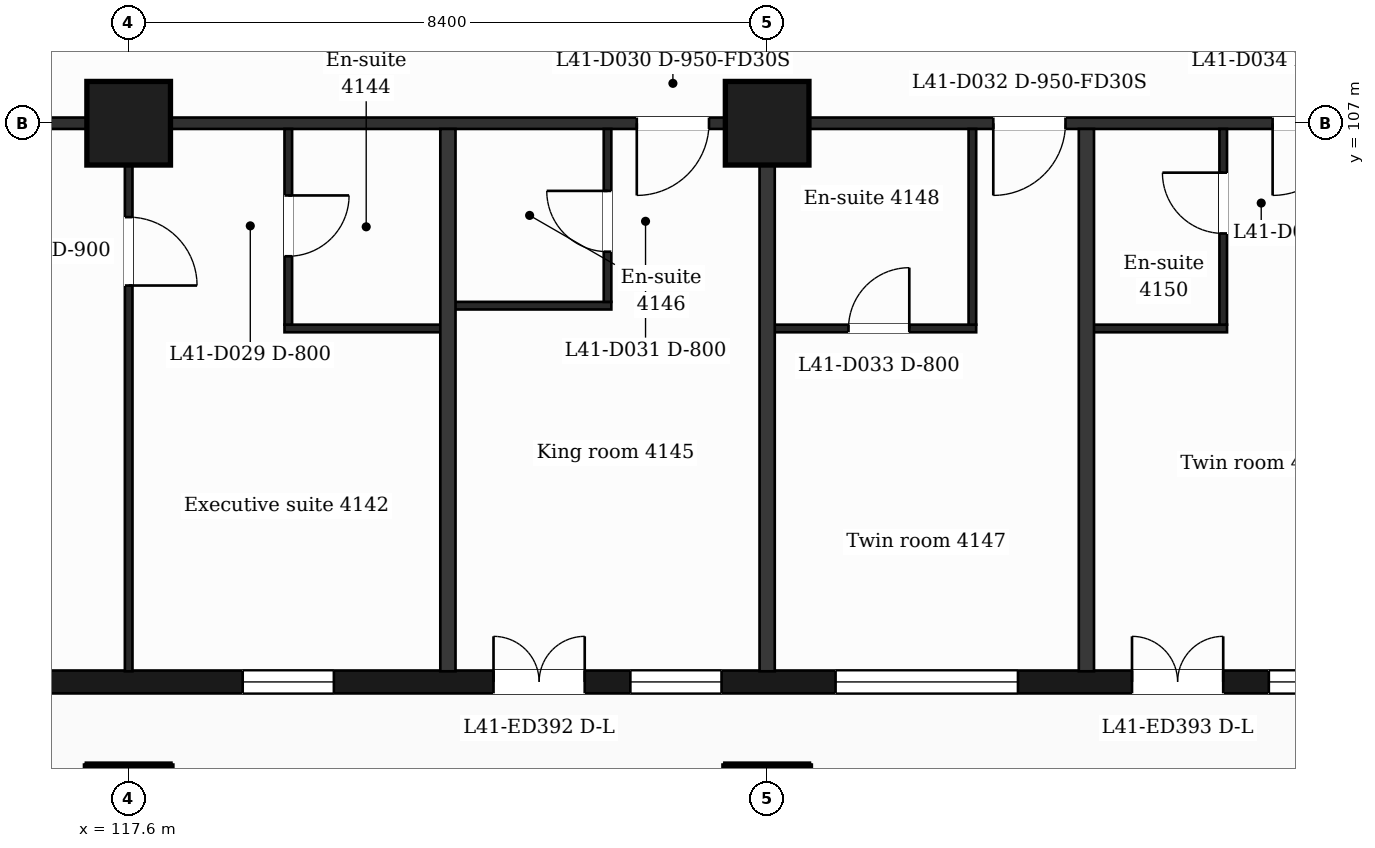
"""IFC4 building model, lengths in metres.
Left out: names, types, materials, properties, quantities, classifications, styles, units other than length and angle.
Written with IfcOpenShell. Run it as: python <this file> out.ifc"""

import sys

from ifc_helpers import new_model, si_unit, direction, frame, frame_2d, origin, origin_2d, place, context, subcontext, project, spatial, rectangle, extrude, element, fill, save


model = new_model("IFC4")
c1 = context("Model", 3, precision=1e-05, world=origin(), true_north=direction((0.0, 1.0)))
c2 = subcontext(c1, "Body", "Model", "MODEL_VIEW")
j1 = project(units=[si_unit("LENGTHUNIT", "METRE"), si_unit("PLANEANGLEUNIT", "RADIAN")], contexts=[c1])
p1 = place(None, origin())
s1 = spatial("IfcSite", under=j1, at=p1, CompositionType="ELEMENT")
p2 = place(p1, origin())
s2 = spatial("IfcBuilding", under=s1, at=p2, CompositionType="ELEMENT")
p3 = place(p2, frame((0.0, 0.0, 173.7)))
s3 = spatial("IfcBuildingStorey", under=s2, at=p3, CompositionType="ELEMENT", Elevation=173.7)
for number, where, z_axis, x_axis in (
    (1, (117.6, 98.0, 0.0), (0.0, 0.0, 1.0), (1.0, 0.0, 0.0)),
    (2, (126.0, 98.0, 0.0), (0.0, 0.0, 1.0), (1.0, 0.0, 0.0)),
    (3, (117.6, 107.0, 0.0), (0.0, 0.0, 1.0), (1.0, 0.0, 0.0)),
    (4, (126.0, 107.0, 0.0), (0.0, 0.0, 1.0), (1.0, 0.0, 0.0)),
):
    element("IfcColumn", number, at=place(p3, frame(where, z_axis=z_axis, x_axis=x_axis)), inside=s3, PredefinedType="COLUMN", context=c2, shape_type="SweptSolid", body=[
        extrude(rectangle(XDim=1.1, YDim=1.1, at=origin_2d()), origin(), (0.0, 0.0, 1.0), 3.7),
    ])
p4 = place(p3, frame((89.85, 99.65, 0.0), z_axis=(0.0, 0.0, 1.0), x_axis=(1.0, 0.0, 0.0)))
e5 = element("IfcWall", 5, at=p4, inside=s3, PredefinedType="SOLIDWALL", context=c2, shape_type="SweptSolid", body=[
    extrude(rectangle(XDim=47.25, YDim=0.3, at=frame_2d((23.625, 0.0))), origin(), (0.0, 0.0, 1.0), 3.38),
])
p5 = place(p4, frame((0.725, 0.0, 0.9)))
e6 = element("IfcOpeningElement", 6, at=p5, cuts=e5, PredefinedType="OPENING", context=c2, shape_type="SweptSolid", body=[
    extrude(rectangle(XDim=1.2, YDim=2.1, at=frame_2d((0.6, 1.05))), frame((0.0, 0.16, 0.0), z_axis=(0.0, -1.0, 0.0), x_axis=(1.0, 0.0, 0.0)), (0.0, 0.0, 1.0), 0.32),
])
p6 = place(p4, frame((3.45, 0.0, 0.9)))
e7 = element("IfcOpeningElement", 7, at=p6, cuts=e5, PredefinedType="OPENING", context=c2, shape_type="SweptSolid", body=[
    extrude(rectangle(XDim=2.4, YDim=2.1, at=frame_2d((1.2, 1.05))), frame((0.0, 0.16, 0.0), z_axis=(0.0, -1.0, 0.0), x_axis=(1.0, 0.0, 0.0)), (0.0, 0.0, 1.0), 0.32),
])
p7 = place(p4, frame((7.65, 0.0, 0.9)))
e8 = element("IfcOpeningElement", 8, at=p7, cuts=e5, PredefinedType="OPENING", context=c2, shape_type="SweptSolid", body=[
    extrude(rectangle(XDim=2.4, YDim=2.1, at=frame_2d((1.2, 1.05))), frame((0.0, 0.16, 0.0), z_axis=(0.0, -1.0, 0.0), x_axis=(1.0, 0.0, 0.0)), (0.0, 0.0, 1.0), 0.32),
])
p8 = place(p4, frame((11.85, 0.0, 0.9)))
e9 = element("IfcOpeningElement", 9, at=p8, cuts=e5, PredefinedType="OPENING", context=c2, shape_type="SweptSolid", body=[
    extrude(rectangle(XDim=2.4, YDim=2.1, at=frame_2d((1.2, 1.05))), frame((0.0, 0.16, 0.0), z_axis=(0.0, -1.0, 0.0), x_axis=(1.0, 0.0, 0.0)), (0.0, 0.0, 1.0), 0.32),
])
p9 = place(p4, frame((16.05, 0.0, 0.9)))
e10 = element("IfcOpeningElement", 10, at=p9, cuts=e5, PredefinedType="OPENING", context=c2, shape_type="SweptSolid", body=[
    extrude(rectangle(XDim=2.4, YDim=2.1, at=frame_2d((1.2, 1.05))), frame((0.0, 0.16, 0.0), z_axis=(0.0, -1.0, 0.0), x_axis=(1.0, 0.0, 0.0)), (0.0, 0.0, 1.0), 0.32),
])
p10 = place(p4, frame((20.25, 0.0, 0.9)))
e11 = element("IfcOpeningElement", 11, at=p10, cuts=e5, PredefinedType="OPENING", context=c2, shape_type="SweptSolid", body=[
    extrude(rectangle(XDim=2.4, YDim=2.1, at=frame_2d((1.2, 1.05))), frame((0.0, 0.16, 0.0), z_axis=(0.0, -1.0, 0.0), x_axis=(1.0, 0.0, 0.0)), (0.0, 0.0, 1.0), 0.32),
])
p11 = place(p4, frame((25.05, 0.0, 0.9)))
e12 = element("IfcOpeningElement", 12, at=p11, cuts=e5, PredefinedType="OPENING", context=c2, shape_type="SweptSolid", body=[
    extrude(rectangle(XDim=1.2, YDim=2.1, at=frame_2d((0.6, 1.05))), frame((0.0, 0.16, 0.0), z_axis=(0.0, -1.0, 0.0), x_axis=(1.0, 0.0, 0.0)), (0.0, 0.0, 1.0), 0.32),
])
p12 = place(p4, frame((29.25, 0.0, 0.9)))
e13 = element("IfcOpeningElement", 13, at=p12, cuts=e5, PredefinedType="OPENING", context=c2, shape_type="SweptSolid", body=[
    extrude(rectangle(XDim=1.2, YDim=2.1, at=frame_2d((0.6, 1.05))), frame((0.0, 0.16, 0.0), z_axis=(0.0, -1.0, 0.0), x_axis=(1.0, 0.0, 0.0)), (0.0, 0.0, 1.0), 0.32),
])
p13 = place(p4, frame((32.55, 0.0, 0.0)))
e14 = element("IfcOpeningElement", 14, at=p13, cuts=e5, PredefinedType="OPENING", context=c2, shape_type="SweptSolid", body=[
    extrude(rectangle(XDim=1.2, YDim=2.4, at=frame_2d((0.6, 1.2))), frame((0.0, 0.16, 0.0), z_axis=(0.0, -1.0, 0.0), x_axis=(1.0, 0.0, 0.0)), (0.0, 0.0, 1.0), 0.32),
])
p14 = place(p4, frame((34.35, 0.0, 0.9)))
e15 = element("IfcOpeningElement", 15, at=p14, cuts=e5, PredefinedType="OPENING", context=c2, shape_type="SweptSolid", body=[
    extrude(rectangle(XDim=1.2, YDim=2.1, at=frame_2d((0.6, 1.05))), frame((0.0, 0.16, 0.0), z_axis=(0.0, -1.0, 0.0), x_axis=(1.0, 0.0, 0.0)), (0.0, 0.0, 1.0), 0.32),
])
p15 = place(p4, frame((37.05, 0.0, 0.9)))
e16 = element("IfcOpeningElement", 16, at=p15, cuts=e5, PredefinedType="OPENING", context=c2, shape_type="SweptSolid", body=[
    extrude(rectangle(XDim=2.4, YDim=2.1, at=frame_2d((1.2, 1.05))), frame((0.0, 0.16, 0.0), z_axis=(0.0, -1.0, 0.0), x_axis=(1.0, 0.0, 0.0)), (0.0, 0.0, 1.0), 0.32),
])
p16 = place(p4, frame((40.95, 0.0, 0.0)))
e17 = element("IfcOpeningElement", 17, at=p16, cuts=e5, PredefinedType="OPENING", context=c2, shape_type="SweptSolid", body=[
    extrude(rectangle(XDim=1.2, YDim=2.4, at=frame_2d((0.6, 1.2))), frame((0.0, 0.16, 0.0), z_axis=(0.0, -1.0, 0.0), x_axis=(1.0, 0.0, 0.0)), (0.0, 0.0, 1.0), 0.32),
])
p17 = place(p4, frame((42.75, 0.0, 0.9)))
e18 = element("IfcOpeningElement", 18, at=p17, cuts=e5, PredefinedType="OPENING", context=c2, shape_type="SweptSolid", body=[
    extrude(rectangle(XDim=1.2, YDim=2.1, at=frame_2d((0.6, 1.05))), frame((0.0, 0.16, 0.0), z_axis=(0.0, -1.0, 0.0), x_axis=(1.0, 0.0, 0.0)), (0.0, 0.0, 1.0), 0.32),
])
p18 = place(p4, frame((45.25, 0.0, 0.9)))
e19 = element("IfcOpeningElement", 19, at=p18, cuts=e5, PredefinedType="OPENING", context=c2, shape_type="SweptSolid", body=[
    extrude(rectangle(XDim=1.2, YDim=2.1, at=frame_2d((0.6, 1.05))), frame((0.0, 0.16, 0.0), z_axis=(0.0, -1.0, 0.0), x_axis=(1.0, 0.0, 0.0)), (0.0, 0.0, 1.0), 0.32),
])
p19 = place(p3, frame((119.65, 104.3, 0.0), z_axis=(0.0, 0.0, 1.0), x_axis=(1.0, 0.0, 0.0)))
e20 = element("IfcWall", 20, at=p19, inside=s3, PredefinedType="PARTITIONING", context=c2, shape_type="SweptSolid", body=[
    extrude(rectangle(XDim=2.15, YDim=0.1, at=frame_2d((1.075, 0.0))), origin(), (0.0, 0.0, 1.0), 3.38),
])
p20 = place(p3, frame((126.0, 104.3, 0.0), z_axis=(0.0, 0.0, 1.0), x_axis=(1.0, 0.0, 0.0)))
e21 = element("IfcWall", 21, at=p20, inside=s3, PredefinedType="PARTITIONING", context=c2, shape_type="SweptSolid", body=[
    extrude(rectangle(XDim=2.75, YDim=0.1, at=frame_2d((1.375, 0.0))), origin(), (0.0, 0.0, 1.0), 3.38),
])
p21 = place(p20, frame((1.07, 0.0, 0.0)))
e22 = element("IfcOpeningElement", 22, at=p21, cuts=e21, PredefinedType="OPENING", context=c2, shape_type="SweptSolid", body=[
    extrude(rectangle(XDim=0.8, YDim=2.1, at=frame_2d((0.4, 1.05))), frame((0.0, 0.06, 0.0), z_axis=(0.0, -1.0, 0.0), x_axis=(1.0, 0.0, 0.0)), (0.0, 0.0, 1.0), 0.12),
])
p22 = place(p3, frame((130.2, 104.3, 0.0), z_axis=(0.0, 0.0, 1.0), x_axis=(1.0, 0.0, 0.0)))
e23 = element("IfcWall", 23, at=p22, inside=s3, PredefinedType="PARTITIONING", context=c2, shape_type="SweptSolid", body=[
    extrude(rectangle(XDim=1.85, YDim=0.1, at=frame_2d((0.925, 0.0))), origin(), (0.0, 0.0, 1.0), 3.38),
])
p23 = place(p3, frame((121.8, 104.6, 0.0), z_axis=(0.0, 0.0, 1.0), x_axis=(1.0, 0.0, 0.0)))
e24 = element("IfcWall", 24, at=p23, inside=s3, PredefinedType="PARTITIONING", context=c2, shape_type="SweptSolid", body=[
    extrude(rectangle(XDim=2.15, YDim=0.1, at=frame_2d((1.075, 0.0))), origin(), (0.0, 0.0, 1.0), 3.38),
])
p24 = place(p3, frame((87.018, 107.0, 0.0), z_axis=(0.0, 0.0, 1.0), x_axis=(1.0, 0.0, 0.0)))
e25 = element("IfcWall", 25, at=p24, inside=s3, PredefinedType="PARTITIONING", context=c2, shape_type="SweptSolid", body=[
    extrude(rectangle(XDim=52.765, YDim=0.15, at=frame_2d((26.382, 0.0))), origin(), (0.0, 0.0, 1.0), 3.38),
])
p25 = place(p24, frame((1.276, 0.0, 0.0)))
e26 = element("IfcOpeningElement", 26, at=p25, cuts=e25, PredefinedType="OPENING", context=c2, shape_type="SweptSolid", body=[
    extrude(rectangle(XDim=0.95, YDim=2.1, at=frame_2d((0.475, 1.05))), frame((0.0, 0.085, 0.0), z_axis=(0.0, -1.0, 0.0), x_axis=(1.0, 0.0, 0.0)), (0.0, 0.0, 1.0), 0.17),
])
p26 = place(p24, frame((8.357, 0.0, 0.0)))
e27 = element("IfcOpeningElement", 27, at=p26, cuts=e25, PredefinedType="OPENING", context=c2, shape_type="SweptSolid", body=[
    extrude(rectangle(XDim=0.95, YDim=2.1, at=frame_2d((0.475, 1.05))), frame((0.0, 0.085, 0.0), z_axis=(0.0, -1.0, 0.0), x_axis=(1.0, 0.0, 0.0)), (0.0, 0.0, 1.0), 0.17),
])
p27 = place(p24, frame((9.832, 0.0, 0.0)))
e28 = element("IfcOpeningElement", 28, at=p27, cuts=e25, PredefinedType="OPENING", context=c2, shape_type="SweptSolid", body=[
    extrude(rectangle(XDim=1.0, YDim=2.1, at=frame_2d((0.5, 1.05))), frame((0.0, 0.085, 0.0), z_axis=(0.0, -1.0, 0.0), x_axis=(1.0, 0.0, 0.0)), (0.0, 0.0, 1.0), 0.17),
])
p28 = place(p24, frame((14.547, 0.0, 0.0)))
e29 = element("IfcOpeningElement", 29, at=p28, cuts=e25, PredefinedType="OPENING", context=c2, shape_type="SweptSolid", body=[
    extrude(rectangle(XDim=0.95, YDim=2.1, at=frame_2d((0.475, 1.05))), frame((0.0, 0.085, 0.0), z_axis=(0.0, -1.0, 0.0), x_axis=(1.0, 0.0, 0.0)), (0.0, 0.0, 1.0), 0.17),
])
p29 = place(p24, frame((18.257, 0.0, 0.0)))
e30 = element("IfcOpeningElement", 30, at=p29, cuts=e25, PredefinedType="OPENING", context=c2, shape_type="SweptSolid", body=[
    extrude(rectangle(XDim=0.95, YDim=2.1, at=frame_2d((0.475, 1.05))), frame((0.0, 0.085, 0.0), z_axis=(0.0, -1.0, 0.0), x_axis=(1.0, 0.0, 0.0)), (0.0, 0.0, 1.0), 0.17),
])
p30 = place(p24, frame((25.212, 0.0, 0.0)))
e31 = element("IfcOpeningElement", 31, at=p30, cuts=e25, PredefinedType="OPENING", context=c2, shape_type="SweptSolid", body=[
    extrude(rectangle(XDim=1.0, YDim=2.1, at=frame_2d((0.5, 1.05))), frame((0.0, 0.085, 0.0), z_axis=(0.0, -1.0, 0.0), x_axis=(1.0, 0.0, 0.0)), (0.0, 0.0, 1.0), 0.17),
])
p31 = place(p24, frame((37.267, 0.0, 0.0)))
e32 = element("IfcOpeningElement", 32, at=p31, cuts=e25, PredefinedType="OPENING", context=c2, shape_type="SweptSolid", body=[
    extrude(rectangle(XDim=0.95, YDim=2.1, at=frame_2d((0.475, 1.05))), frame((0.0, 0.085, 0.0), z_axis=(0.0, -1.0, 0.0), x_axis=(1.0, 0.0, 0.0)), (0.0, 0.0, 1.0), 0.17),
])
p32 = place(p24, frame((41.957, 0.0, 0.0)))
e33 = element("IfcOpeningElement", 33, at=p32, cuts=e25, PredefinedType="OPENING", context=c2, shape_type="SweptSolid", body=[
    extrude(rectangle(XDim=0.95, YDim=2.1, at=frame_2d((0.475, 1.05))), frame((0.0, 0.085, 0.0), z_axis=(0.0, -1.0, 0.0), x_axis=(1.0, 0.0, 0.0)), (0.0, 0.0, 1.0), 0.17),
])
p33 = place(p24, frame((45.632, 0.0, 0.0)))
e34 = element("IfcOpeningElement", 34, at=p33, cuts=e25, PredefinedType="OPENING", context=c2, shape_type="SweptSolid", body=[
    extrude(rectangle(XDim=0.95, YDim=2.1, at=frame_2d((0.475, 1.05))), frame((0.0, 0.085, 0.0), z_axis=(0.0, -1.0, 0.0), x_axis=(1.0, 0.0, 0.0)), (0.0, 0.0, 1.0), 0.17),
])
p34 = place(p24, frame((48.767, 0.0, 0.0)))
e35 = element("IfcOpeningElement", 35, at=p34, cuts=e25, PredefinedType="OPENING", context=c2, shape_type="SweptSolid", body=[
    extrude(rectangle(XDim=0.95, YDim=2.1, at=frame_2d((0.475, 1.05))), frame((0.0, 0.085, 0.0), z_axis=(0.0, -1.0, 0.0), x_axis=(1.0, 0.0, 0.0)), (0.0, 0.0, 1.0), 0.17),
])
p35 = place(p3, frame((117.6, 99.79, 0.0), z_axis=(0.0, 0.0, 1.0), x_axis=(0.0, 1.0, 0.0)))
e36 = element("IfcWall", 36, at=p35, inside=s3, PredefinedType="PARTITIONING", context=c2, shape_type="SweptSolid", body=[
    extrude(rectangle(XDim=7.135, YDim=0.1, at=frame_2d((3.567, 0.0))), origin(), (0.0, 0.0, 1.0), 3.38),
])
p36 = place(p35, frame((5.075, 0.0, 0.0)))
e37 = element("IfcOpeningElement", 37, at=p36, cuts=e36, PredefinedType="OPENING", context=c2, shape_type="SweptSolid", body=[
    extrude(rectangle(XDim=0.9, YDim=2.1, at=frame_2d((0.45, 1.05))), frame((0.0, 0.06, 0.0), z_axis=(0.0, -1.0, 0.0), x_axis=(1.0, 0.0, 0.0)), (0.0, 0.0, 1.0), 0.12),
])
p37 = place(p3, frame((119.7, 104.35, 0.0), z_axis=(0.0, 0.0, 1.0), x_axis=(0.0, 1.0, 0.0)))
e38 = element("IfcWall", 38, at=p37, inside=s3, PredefinedType="PARTITIONING", context=c2, shape_type="SweptSolid", body=[
    extrude(rectangle(XDim=2.575, YDim=0.1, at=frame_2d((1.288, 0.0))), origin(), (0.0, 0.0, 1.0), 3.38),
])
p38 = place(p37, frame((0.9, 0.0, 0.0)))
e39 = element("IfcOpeningElement", 39, at=p38, cuts=e38, PredefinedType="OPENING", context=c2, shape_type="SweptSolid", body=[
    extrude(rectangle(XDim=0.8, YDim=2.1, at=frame_2d((0.4, 1.05))), frame((0.0, 0.06, 0.0), z_axis=(0.0, -1.0, 0.0), x_axis=(1.0, 0.0, 0.0)), (0.0, 0.0, 1.0), 0.12),
])
p39 = place(p3, frame((121.8, 99.79, 0.0), z_axis=(0.0, 0.0, 1.0), x_axis=(0.0, 1.0, 0.0)))
e40 = element("IfcWall", 40, at=p39, inside=s3, PredefinedType="PARTITIONING", context=c2, shape_type="SweptSolid", body=[
    extrude(rectangle(XDim=7.135, YDim=0.2, at=frame_2d((3.567, 0.0))), origin(), (0.0, 0.0, 1.0), 3.38),
])
p40 = place(p3, frame((123.9, 104.65, 0.0), z_axis=(0.0, 0.0, 1.0), x_axis=(0.0, 1.0, 0.0)))
e41 = element("IfcWall", 41, at=p40, inside=s3, PredefinedType="PARTITIONING", context=c2, shape_type="SweptSolid", body=[
    extrude(rectangle(XDim=2.275, YDim=0.1, at=frame_2d((1.138, 0.0))), origin(), (0.0, 0.0, 1.0), 3.38),
])
p41 = place(p40, frame((0.66, 0.0, 0.0)))
e42 = element("IfcOpeningElement", 42, at=p41, cuts=e41, PredefinedType="OPENING", context=c2, shape_type="SweptSolid", body=[
    extrude(rectangle(XDim=0.8, YDim=2.1, at=frame_2d((0.4, 1.05))), frame((0.0, 0.06, 0.0), z_axis=(0.0, -1.0, 0.0), x_axis=(1.0, 0.0, 0.0)), (0.0, 0.0, 1.0), 0.12),
])
p42 = place(p3, frame((126.0, 99.79, 0.0), z_axis=(0.0, 0.0, 1.0), x_axis=(0.0, 1.0, 0.0)))
e43 = element("IfcWall", 43, at=p42, inside=s3, PredefinedType="PARTITIONING", context=c2, shape_type="SweptSolid", body=[
    extrude(rectangle(XDim=7.135, YDim=0.2, at=frame_2d((3.567, 0.0))), origin(), (0.0, 0.0, 1.0), 3.38),
])
p43 = place(p3, frame((128.7, 104.35, 0.0), z_axis=(0.0, 0.0, 1.0), x_axis=(0.0, 1.0, 0.0)))
e44 = element("IfcWall", 44, at=p43, inside=s3, PredefinedType="PARTITIONING", context=c2, shape_type="SweptSolid", body=[
    extrude(rectangle(XDim=2.575, YDim=0.1, at=frame_2d((1.288, 0.0))), origin(), (0.0, 0.0, 1.0), 3.38),
])
p44 = place(p3, frame((130.2, 99.79, 0.0), z_axis=(0.0, 0.0, 1.0), x_axis=(0.0, 1.0, 0.0)))
e45 = element("IfcWall", 45, at=p44, inside=s3, PredefinedType="PARTITIONING", context=c2, shape_type="SweptSolid", body=[
    extrude(rectangle(XDim=7.135, YDim=0.2, at=frame_2d((3.567, 0.0))), origin(), (0.0, 0.0, 1.0), 3.38),
])
p45 = place(p3, frame((132.0, 104.35, 0.0), z_axis=(0.0, 0.0, 1.0), x_axis=(0.0, 1.0, 0.0)))
e46 = element("IfcWall", 46, at=p45, inside=s3, PredefinedType="PARTITIONING", context=c2, shape_type="SweptSolid", body=[
    extrude(rectangle(XDim=2.575, YDim=0.1, at=frame_2d((1.288, 0.0))), origin(), (0.0, 0.0, 1.0), 3.38),
])
p46 = place(p45, frame((1.2, 0.0, 0.0)))
e47 = element("IfcOpeningElement", 47, at=p46, cuts=e46, PredefinedType="OPENING", context=c2, shape_type="SweptSolid", body=[
    extrude(rectangle(XDim=0.8, YDim=2.1, at=frame_2d((0.4, 1.05))), frame((0.0, 0.06, 0.0), z_axis=(0.0, -1.0, 0.0), x_axis=(1.0, 0.0, 0.0)), (0.0, 0.0, 1.0), 0.12),
])
p47 = place(p12, origin())
e48 = element("IfcWindow", 48, at=p47, inside=s3, PartitioningType="SINGLE_PANEL", PredefinedType="WINDOW", context=c2, shape_type="SweptSolid", body=[
    extrude(rectangle(XDim=1.2, YDim=2.1, at=frame_2d((0.6, 1.05))), frame((0.0, 0.03, 0.0), z_axis=(0.0, -1.0, 0.0), x_axis=(1.0, 0.0, 0.0)), (0.0, 0.0, 1.0), 0.06),
])
fill(e13, e48)
p48 = place(p13, origin())
e49 = element("IfcDoor", 49, at=p48, inside=s3, OperationType="DOUBLE_DOOR_SINGLE_SWING", PredefinedType="DOOR", context=c2, shape_type="SweptSolid", body=[
    extrude(rectangle(XDim=1.2, YDim=2.4, at=frame_2d((0.6, 1.2))), frame((0.0, 0.025, 0.0), z_axis=(0.0, -1.0, 0.0), x_axis=(1.0, 0.0, 0.0)), (0.0, 0.0, 1.0), 0.05),
])
fill(e14, e49)
p49 = place(p14, origin())
e50 = element("IfcWindow", 50, at=p49, inside=s3, PartitioningType="SINGLE_PANEL", PredefinedType="WINDOW", context=c2, shape_type="SweptSolid", body=[
    extrude(rectangle(XDim=1.2, YDim=2.1, at=frame_2d((0.6, 1.05))), frame((0.0, 0.03, 0.0), z_axis=(0.0, -1.0, 0.0), x_axis=(1.0, 0.0, 0.0)), (0.0, 0.0, 1.0), 0.06),
])
fill(e15, e50)
p50 = place(p15, origin())
e51 = element("IfcWindow", 51, at=p50, inside=s3, PartitioningType="SINGLE_PANEL", PredefinedType="WINDOW", context=c2, shape_type="SweptSolid", body=[
    extrude(rectangle(XDim=2.4, YDim=2.1, at=frame_2d((1.2, 1.05))), frame((0.0, 0.03, 0.0), z_axis=(0.0, -1.0, 0.0), x_axis=(1.0, 0.0, 0.0)), (0.0, 0.0, 1.0), 0.06),
])
fill(e16, e51)
p51 = place(p16, origin())
e52 = element("IfcDoor", 52, at=p51, inside=s3, OperationType="DOUBLE_DOOR_SINGLE_SWING", PredefinedType="DOOR", context=c2, shape_type="SweptSolid", body=[
    extrude(rectangle(XDim=1.2, YDim=2.4, at=frame_2d((0.6, 1.2))), frame((0.0, 0.025, 0.0), z_axis=(0.0, -1.0, 0.0), x_axis=(1.0, 0.0, 0.0)), (0.0, 0.0, 1.0), 0.05),
])
fill(e17, e52)
p52 = place(p17, origin())
e53 = element("IfcWindow", 53, at=p52, inside=s3, PartitioningType="SINGLE_PANEL", PredefinedType="WINDOW", context=c2, shape_type="SweptSolid", body=[
    extrude(rectangle(XDim=1.2, YDim=2.1, at=frame_2d((0.6, 1.05))), frame((0.0, 0.03, 0.0), z_axis=(0.0, -1.0, 0.0), x_axis=(1.0, 0.0, 0.0)), (0.0, 0.0, 1.0), 0.06),
])
fill(e18, e53)
p53 = place(p36, origin())
e54 = element("IfcDoor", 54, at=p53, inside=s3, OperationType="SINGLE_SWING_LEFT", PredefinedType="DOOR", context=c2, shape_type="SweptSolid", body=[
    extrude(rectangle(XDim=0.9, YDim=2.1, at=frame_2d((0.45, 1.05))), frame((0.0, 0.025, 0.0), z_axis=(0.0, -1.0, 0.0), x_axis=(1.0, 0.0, 0.0)), (0.0, 0.0, 1.0), 0.05),
])
fill(e37, e54)
p54 = place(p38, origin())
e55 = element("IfcDoor", 55, at=p54, inside=s3, OperationType="SINGLE_SWING_RIGHT", PredefinedType="DOOR", context=c2, shape_type="SweptSolid", body=[
    extrude(rectangle(XDim=0.8, YDim=2.1, at=frame_2d((0.4, 1.05))), frame((0.0, 0.025, 0.0), z_axis=(0.0, -1.0, 0.0), x_axis=(1.0, 0.0, 0.0)), (0.0, 0.0, 1.0), 0.05),
])
fill(e39, e55)
p55 = place(p31, origin())
e56 = element("IfcDoor", 56, at=p55, inside=s3, OperationType="SINGLE_SWING_LEFT", PredefinedType="DOOR", context=c2, shape_type="SweptSolid", body=[
    extrude(rectangle(XDim=0.95, YDim=2.1, at=frame_2d((0.475, 1.05))), frame((0.0, 0.025, 0.0), z_axis=(0.0, -1.0, 0.0), x_axis=(1.0, 0.0, 0.0)), (0.0, 0.0, 1.0), 0.05),
])
fill(e32, e56)
p56 = place(p41, origin())
e57 = element("IfcDoor", 57, at=p56, inside=s3, OperationType="SINGLE_SWING_RIGHT", PredefinedType="DOOR", context=c2, shape_type="SweptSolid", body=[
    extrude(rectangle(XDim=0.8, YDim=2.1, at=frame_2d((0.4, 1.05))), frame((0.0, 0.025, 0.0), z_axis=(0.0, -1.0, 0.0), x_axis=(1.0, 0.0, 0.0)), (0.0, 0.0, 1.0), 0.05),
])
fill(e42, e57)
p57 = place(p32, origin())
e58 = element("IfcDoor", 58, at=p57, inside=s3, OperationType="SINGLE_SWING_LEFT", PredefinedType="DOOR", context=c2, shape_type="SweptSolid", body=[
    extrude(rectangle(XDim=0.95, YDim=2.1, at=frame_2d((0.475, 1.05))), frame((0.0, 0.025, 0.0), z_axis=(0.0, -1.0, 0.0), x_axis=(1.0, 0.0, 0.0)), (0.0, 0.0, 1.0), 0.05),
])
fill(e33, e58)
p58 = place(p21, origin())
e59 = element("IfcDoor", 59, at=p58, inside=s3, OperationType="SINGLE_SWING_RIGHT", PredefinedType="DOOR", context=c2, shape_type="SweptSolid", body=[
    extrude(rectangle(XDim=0.8, YDim=2.1, at=frame_2d((0.4, 1.05))), frame((0.0, 0.025, 0.0), z_axis=(0.0, -1.0, 0.0), x_axis=(1.0, 0.0, 0.0)), (0.0, 0.0, 1.0), 0.05),
])
fill(e22, e59)
p59 = place(p33, origin())
e60 = element("IfcDoor", 60, at=p59, inside=s3, OperationType="SINGLE_SWING_LEFT", PredefinedType="DOOR", context=c2, shape_type="SweptSolid", body=[
    extrude(rectangle(XDim=0.95, YDim=2.1, at=frame_2d((0.475, 1.05))), frame((0.0, 0.025, 0.0), z_axis=(0.0, -1.0, 0.0), x_axis=(1.0, 0.0, 0.0)), (0.0, 0.0, 1.0), 0.05),
])
fill(e34, e60)
p60 = place(p46, origin())
e61 = element("IfcDoor", 61, at=p60, inside=s3, OperationType="SINGLE_SWING_RIGHT", PredefinedType="DOOR", context=c2, shape_type="SweptSolid", body=[
    extrude(rectangle(XDim=0.8, YDim=2.1, at=frame_2d((0.4, 1.05))), frame((0.0, 0.025, 0.0), z_axis=(0.0, -1.0, 0.0), x_axis=(1.0, 0.0, 0.0)), (0.0, 0.0, 1.0), 0.05),
])
fill(e47, e61)
save(model, sys.argv[1])
